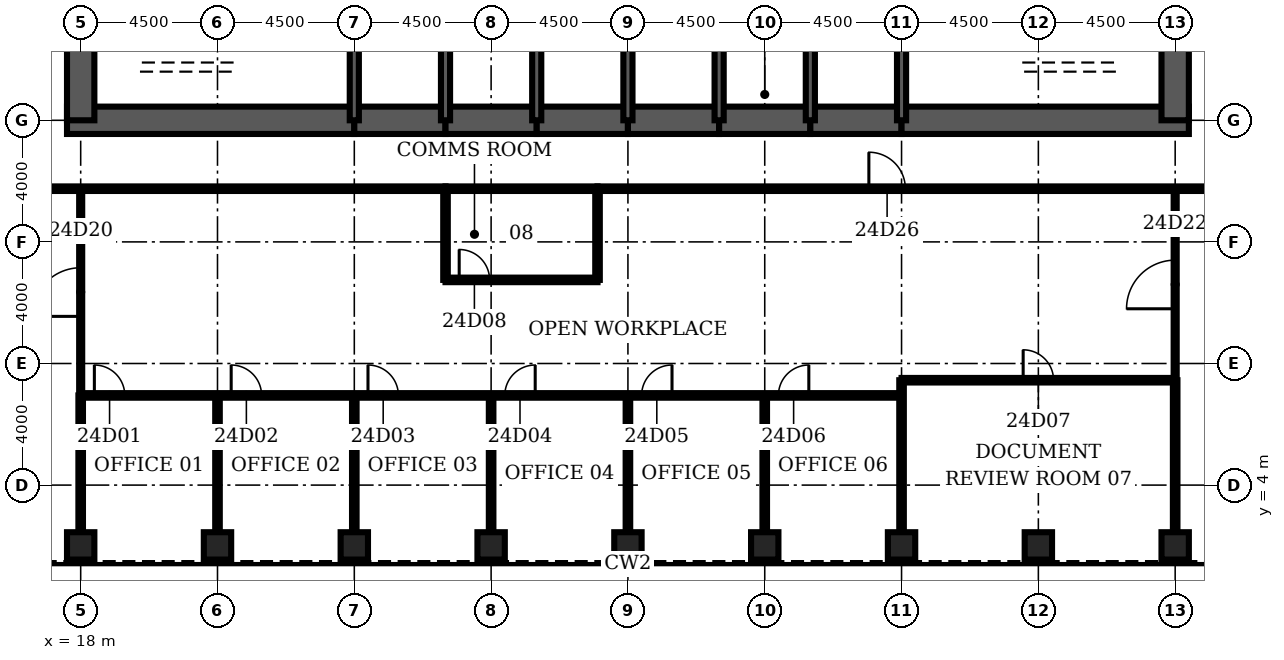
"""IFC4 building model, lengths in metres.
Left out: names, types, materials, properties, quantities, classifications, styles, units other than length and angle.
Written with IfcOpenShell. Run it as: python <this file> out.ifc"""

import sys

from ifc_helpers import new_model, si_unit, direction, frame, frame_2d, origin, origin_2d, place, context, subcontext, project, spatial, rectangle, hollow_rectangle, extrude, element, fill, save


model = new_model("IFC4")
c1 = context("Model", 3, precision=1e-05, world=origin(), true_north=direction((0.0, 1.0)))
c2 = subcontext(c1, "Body", "Model", "MODEL_VIEW")
j1 = project(units=[si_unit("LENGTHUNIT", "METRE"), si_unit("PLANEANGLEUNIT", "RADIAN")], contexts=[c1])
p1 = place(None, origin())
s1 = spatial("IfcSite", under=j1, at=p1, CompositionType="ELEMENT")
p2 = place(p1, origin())
s2 = spatial("IfcBuilding", under=s1, at=p2, CompositionType="ELEMENT")
p3 = place(p2, frame((0.0, 0.0, 113.1)))
s3 = spatial("IfcBuildingStorey", under=s2, at=p3, CompositionType="ELEMENT", Elevation=113.1)
for number, where, z_axis, x_axis in (
    (1, (18.0, 2.0, 0.0), (0.0, 0.0, 1.0), (0.0, 1.0, 0.0)),
    (2, (22.5, 2.0, 0.0), (0.0, 0.0, 1.0), (0.0, 1.0, 0.0)),
    (3, (27.0, 2.0, 0.0), (0.0, 0.0, 1.0), (0.0, 1.0, 0.0)),
    (4, (31.5, 2.0, 0.0), (0.0, 0.0, 1.0), (0.0, 1.0, 0.0)),
    (5, (36.0, 2.0, 0.0), (0.0, 0.0, 1.0), (0.0, 1.0, 0.0)),
    (6, (40.5, 2.0, 0.0), (0.0, 0.0, 1.0), (0.0, 1.0, 0.0)),
    (7, (45.0, 2.0, 0.0), (0.0, 0.0, 1.0), (0.0, 1.0, 0.0)),
    (8, (49.5, 2.0, 0.0), (0.0, 0.0, 1.0), (0.0, 1.0, 0.0)),
    (9, (54.0, 2.0, 0.0), (0.0, 0.0, 1.0), (0.0, 1.0, 0.0)),
):
    element("IfcColumn", number, at=place(p3, frame(where, z_axis=z_axis, x_axis=x_axis)), inside=s3, PredefinedType="COLUMN", context=c2, shape_type="SweptSolid", body=[
        extrude(hollow_rectangle(XDim=0.9, YDim=0.9, WallThickness=0.11, at=origin_2d()), origin(), (0.0, 0.0, 1.0), 4.2),
    ])
p4 = place(p3, frame((17.55, 16.0, 0.0), z_axis=(0.0, 0.0, 1.0), x_axis=(1.0, 0.0, 0.0)))
e10 = element("IfcWall", 10, at=p4, inside=s3, PredefinedType="SHEAR", context=c2, shape_type="SweptSolid", body=[
    extrude(rectangle(XDim=9.45, YDim=0.9, at=frame_2d((4.725, 0.0))), origin(), (0.0, 0.0, 1.0), 4.2),
])
for number, where, z_axis, x_axis in (
    (11, (27.0, 16.0, 0.0), (0.0, 0.0, 1.0), (1.0, 0.0, 0.0)),
    (12, (30.0, 16.0, 0.0), (0.0, 0.0, 1.0), (1.0, 0.0, 0.0)),
    (13, (33.0, 16.0, 0.0), (0.0, 0.0, 1.0), (1.0, 0.0, 0.0)),
    (14, (36.0, 16.0, 0.0), (0.0, 0.0, 1.0), (1.0, 0.0, 0.0)),
    (15, (39.0, 16.0, 0.0), (0.0, 0.0, 1.0), (1.0, 0.0, 0.0)),
    (16, (42.0, 16.0, 0.0), (0.0, 0.0, 1.0), (1.0, 0.0, 0.0)),
):
    element("IfcWall", number, at=place(p3, frame(where, z_axis=z_axis, x_axis=x_axis)), inside=s3, PredefinedType="SHEAR", context=c2, shape_type="SweptSolid", body=[
        extrude(rectangle(XDim=3.0, YDim=0.9, at=frame_2d((1.5, 0.0))), origin(), (0.0, 0.0, 1.0), 4.2),
    ])
p5 = place(p3, frame((45.0, 16.0, 0.0), z_axis=(0.0, 0.0, 1.0), x_axis=(1.0, 0.0, 0.0)))
e17 = element("IfcWall", 17, at=p5, inside=s3, PredefinedType="SHEAR", context=c2, shape_type="SweptSolid", body=[
    extrude(rectangle(XDim=9.45, YDim=0.9, at=frame_2d((4.725, 0.0))), origin(), (0.0, 0.0, 1.0), 4.2),
])
for number, where, z_axis, x_axis in (
    (18, (18.0, 19.2, 0.0), (0.0, 0.0, 1.0), (0.0, -1.0, 0.0)),
    (19, (54.0, 16.0, 0.0), (0.0, 0.0, 1.0), (0.0, 1.0, 0.0)),
):
    element("IfcWall", number, at=place(p3, frame(where, z_axis=z_axis, x_axis=x_axis)), inside=s3, PredefinedType="SHEAR", context=c2, shape_type="SweptSolid", body=[
        extrude(rectangle(XDim=3.2, YDim=0.9, at=frame_2d((1.6, 0.0))), origin(), (0.0, 0.0, 1.0), 4.2),
    ])
for number, where, z_axis, x_axis in (
    (20, (27.0, 16.0, 0.0), (0.0, 0.0, 1.0), (0.0, 1.0, 0.0)),
    (21, (30.0, 16.0, 0.0), (0.0, 0.0, 1.0), (0.0, 1.0, 0.0)),
    (22, (33.0, 16.0, 0.0), (0.0, 0.0, 1.0), (0.0, 1.0, 0.0)),
    (23, (36.0, 16.0, 0.0), (0.0, 0.0, 1.0), (0.0, 1.0, 0.0)),
    (24, (39.0, 16.0, 0.0), (0.0, 0.0, 1.0), (0.0, 1.0, 0.0)),
    (25, (42.0, 16.0, 0.0), (0.0, 0.0, 1.0), (0.0, 1.0, 0.0)),
    (26, (45.0, 16.0, 0.0), (0.0, 0.0, 1.0), (0.0, 1.0, 0.0)),
):
    element("IfcWall", number, at=place(p3, frame(where, z_axis=z_axis, x_axis=x_axis)), inside=s3, PredefinedType="SOLIDWALL", context=c2, shape_type="SweptSolid", body=[
        extrude(rectangle(XDim=3.2, YDim=0.3, at=frame_2d((1.6, 0.0))), origin(), (0.0, 0.0, 1.0), 4.2),
    ])
p6 = place(p3, frame((39.15, 17.4, 0.0), z_axis=(0.0, 0.0, 1.0), x_axis=(1.0, 0.0, 0.0)))
e27 = element("IfcWall", 27, at=p6, inside=s3, PredefinedType="SOLIDWALL", context=c2, shape_type="SweptSolid", body=[
    extrude(rectangle(XDim=2.7, YDim=0.3, at=frame_2d((1.35, 0.0))), origin(), (0.0, 0.0, 1.0), 4.04),
])
p7 = place(p6, frame((0.85, 0.0, 0.0)))
e28 = element("IfcOpeningElement", 28, at=p7, cuts=e27, PredefinedType="OPENING", context=c2, shape_type="SweptSolid", body=[
    extrude(rectangle(XDim=1.0, YDim=2.1, at=frame_2d((0.5, 1.05))), frame((0.0, 0.16, 0.0), z_axis=(0.0, -1.0, 0.0), x_axis=(1.0, 0.0, 0.0)), (0.0, 0.0, 1.0), 0.32),
])
p8 = place(p3, frame((18.0, 6.95, 0.0), z_axis=(0.0, 0.0, 1.0), x_axis=(1.0, 0.0, 0.0)))
e29 = element("IfcWall", 29, at=p8, inside=s3, PredefinedType="PARTITIONING", context=c2, shape_type="SweptSolid", body=[
    extrude(rectangle(XDim=27.0, YDim=0.15, at=frame_2d((13.5, 0.0))), origin(), (0.0, 0.0, 1.0), 3.0),
])
p9 = place(p8, frame((0.45, 0.0, 0.0)))
e30 = element("IfcOpeningElement", 30, at=p9, cuts=e29, PredefinedType="OPENING", context=c2, shape_type="SweptSolid", body=[
    extrude(rectangle(XDim=1.0, YDim=2.1, at=frame_2d((0.5, 1.05))), frame((0.0, 0.085, 0.0), z_axis=(0.0, -1.0, 0.0), x_axis=(1.0, 0.0, 0.0)), (0.0, 0.0, 1.0), 0.17),
])
p10 = place(p8, frame((4.95, 0.0, 0.0)))
e31 = element("IfcOpeningElement", 31, at=p10, cuts=e29, PredefinedType="OPENING", context=c2, shape_type="SweptSolid", body=[
    extrude(rectangle(XDim=1.0, YDim=2.1, at=frame_2d((0.5, 1.05))), frame((0.0, 0.085, 0.0), z_axis=(0.0, -1.0, 0.0), x_axis=(1.0, 0.0, 0.0)), (0.0, 0.0, 1.0), 0.17),
])
p11 = place(p8, frame((9.45, 0.0, 0.0)))
e32 = element("IfcOpeningElement", 32, at=p11, cuts=e29, PredefinedType="OPENING", context=c2, shape_type="SweptSolid", body=[
    extrude(rectangle(XDim=1.0, YDim=2.1, at=frame_2d((0.5, 1.05))), frame((0.0, 0.085, 0.0), z_axis=(0.0, -1.0, 0.0), x_axis=(1.0, 0.0, 0.0)), (0.0, 0.0, 1.0), 0.17),
])
p12 = place(p8, frame((13.95, 0.0, 0.0)))
e33 = element("IfcOpeningElement", 33, at=p12, cuts=e29, PredefinedType="OPENING", context=c2, shape_type="SweptSolid", body=[
    extrude(rectangle(XDim=1.0, YDim=2.1, at=frame_2d((0.5, 1.05))), frame((0.0, 0.085, 0.0), z_axis=(0.0, -1.0, 0.0), x_axis=(1.0, 0.0, 0.0)), (0.0, 0.0, 1.0), 0.17),
])
p13 = place(p8, frame((18.45, 0.0, 0.0)))
e34 = element("IfcOpeningElement", 34, at=p13, cuts=e29, PredefinedType="OPENING", context=c2, shape_type="SweptSolid", body=[
    extrude(rectangle(XDim=1.0, YDim=2.1, at=frame_2d((0.5, 1.05))), frame((0.0, 0.085, 0.0), z_axis=(0.0, -1.0, 0.0), x_axis=(1.0, 0.0, 0.0)), (0.0, 0.0, 1.0), 0.17),
])
p14 = place(p8, frame((22.95, 0.0, 0.0)))
e35 = element("IfcOpeningElement", 35, at=p14, cuts=e29, PredefinedType="OPENING", context=c2, shape_type="SweptSolid", body=[
    extrude(rectangle(XDim=1.0, YDim=2.1, at=frame_2d((0.5, 1.05))), frame((0.0, 0.085, 0.0), z_axis=(0.0, -1.0, 0.0), x_axis=(1.0, 0.0, 0.0)), (0.0, 0.0, 1.0), 0.17),
])
p15 = place(p3, frame((45.0, 7.45, 0.0), z_axis=(0.0, 0.0, 1.0), x_axis=(1.0, 0.0, 0.0)))
e36 = element("IfcWall", 36, at=p15, inside=s3, PredefinedType="PARTITIONING", context=c2, shape_type="SweptSolid", body=[
    extrude(rectangle(XDim=9.0, YDim=0.15, at=frame_2d((4.5, 0.0))), origin(), (0.0, 0.0, 1.0), 3.0),
])
p16 = place(p15, frame((4.0, 0.0, 0.0)))
e37 = element("IfcOpeningElement", 37, at=p16, cuts=e36, PredefinedType="OPENING", context=c2, shape_type="SweptSolid", body=[
    extrude(rectangle(XDim=1.0, YDim=2.1, at=frame_2d((0.5, 1.05))), frame((0.0, 0.085, 0.0), z_axis=(0.0, -1.0, 0.0), x_axis=(1.0, 0.0, 0.0)), (0.0, 0.0, 1.0), 0.17),
])
p17 = place(p3, frame((30.0, 10.75, 0.0), z_axis=(0.0, 0.0, 1.0), x_axis=(1.0, 0.0, 0.0)))
e38 = element("IfcWall", 38, at=p17, inside=s3, PredefinedType="PARTITIONING", context=c2, shape_type="SweptSolid", body=[
    extrude(rectangle(XDim=5.0, YDim=0.15, at=frame_2d((2.5, 0.0))), origin(), (0.0, 0.0, 1.0), 3.0),
])
p18 = place(p17, frame((0.45, 0.0, 0.0)))
e39 = element("IfcOpeningElement", 39, at=p18, cuts=e38, PredefinedType="OPENING", context=c2, shape_type="SweptSolid", body=[
    extrude(rectangle(XDim=1.0, YDim=2.1, at=frame_2d((0.5, 1.05))), frame((0.0, 0.085, 0.0), z_axis=(0.0, -1.0, 0.0), x_axis=(1.0, 0.0, 0.0)), (0.0, 0.0, 1.0), 0.17),
])
p19 = place(p3, frame((15.15, 13.75, 0.0), z_axis=(0.0, 0.0, 1.0), x_axis=(1.0, 0.0, 0.0)))
e40 = element("IfcWall", 40, at=p19, inside=s3, PredefinedType="PARTITIONING", context=c2, shape_type="SweptSolid", body=[
    extrude(rectangle(XDim=14.85, YDim=0.15, at=frame_2d((7.425, 0.0))), origin(), (0.0, 0.0, 1.0), 3.0),
])
p20 = place(p3, frame((30.0, 13.75, 0.0), z_axis=(0.0, 0.0, 1.0), x_axis=(1.0, 0.0, 0.0)))
e41 = element("IfcWall", 41, at=p20, inside=s3, PredefinedType="PARTITIONING", context=c2, shape_type="SweptSolid", body=[
    extrude(rectangle(XDim=5.0, YDim=0.15, at=frame_2d((2.5, 0.0))), origin(), (0.0, 0.0, 1.0), 3.0),
])
p21 = place(p3, frame((35.0, 13.75, 0.0), z_axis=(0.0, 0.0, 1.0), x_axis=(1.0, 0.0, 0.0)))
e42 = element("IfcWall", 42, at=p21, inside=s3, PredefinedType="PARTITIONING", context=c2, shape_type="SweptSolid", body=[
    extrude(rectangle(XDim=21.85, YDim=0.15, at=frame_2d((10.925, 0.0))), origin(), (0.0, 0.0, 1.0), 3.0),
])
p22 = place(p21, frame((8.925, 0.0, 0.0)))
e43 = element("IfcOpeningElement", 43, at=p22, cuts=e42, PredefinedType="OPENING", context=c2, shape_type="SweptSolid", body=[
    extrude(rectangle(XDim=1.2, YDim=2.1, at=frame_2d((0.6, 1.05))), frame((0.0, 0.085, 0.0), z_axis=(0.0, -1.0, 0.0), x_axis=(1.0, 0.0, 0.0)), (0.0, 0.0, 1.0), 0.17),
])
p23 = place(p3, frame((18.0, 2.45, 0.0), z_axis=(0.0, 0.0, 1.0), x_axis=(0.0, 1.0, 0.0)))
e44 = element("IfcWall", 44, at=p23, inside=s3, PredefinedType="PARTITIONING", context=c2, shape_type="SweptSolid", body=[
    extrude(rectangle(XDim=4.5, YDim=0.15, at=frame_2d((2.25, 0.0))), origin(), (0.0, 0.0, 1.0), 3.0),
])
p24 = place(p3, frame((18.0, 6.95, 0.0), z_axis=(0.0, 0.0, 1.0), x_axis=(0.0, 1.0, 0.0)))
e45 = element("IfcWall", 45, at=p24, inside=s3, PredefinedType="PARTITIONING", context=c2, shape_type="SweptSolid", body=[
    extrude(rectangle(XDim=6.8, YDim=0.1, at=frame_2d((3.4, 0.0))), origin(), (0.0, 0.0, 1.0), 3.0),
])
p25 = place(p24, frame((2.6, 0.0, 0.0)))
e46 = element("IfcOpeningElement", 46, at=p25, cuts=e45, PredefinedType="OPENING", context=c2, shape_type="SweptSolid", body=[
    extrude(rectangle(XDim=1.6, YDim=2.1, at=frame_2d((0.8, 1.05))), frame((0.0, 0.06, 0.0), z_axis=(0.0, -1.0, 0.0), x_axis=(1.0, 0.0, 0.0)), (0.0, 0.0, 1.0), 0.12),
])
for number, where, z_axis, x_axis in (
    (47, (22.5, 2.45, 0.0), (0.0, 0.0, 1.0), (0.0, 1.0, 0.0)),
    (48, (27.0, 2.45, 0.0), (0.0, 0.0, 1.0), (0.0, 1.0, 0.0)),
):
    element("IfcWall", number, at=place(p3, frame(where, z_axis=z_axis, x_axis=x_axis)), inside=s3, PredefinedType="PARTITIONING", context=c2, shape_type="SweptSolid", body=[
        extrude(rectangle(XDim=4.5, YDim=0.15, at=frame_2d((2.25, 0.0))), origin(), (0.0, 0.0, 1.0), 3.0),
    ])
p26 = place(p3, frame((30.0, 10.75, 0.0), z_axis=(0.0, 0.0, 1.0), x_axis=(0.0, 1.0, 0.0)))
e49 = element("IfcWall", 49, at=p26, inside=s3, PredefinedType="PARTITIONING", context=c2, shape_type="SweptSolid", body=[
    extrude(rectangle(XDim=3.0, YDim=0.15, at=frame_2d((1.5, 0.0))), origin(), (0.0, 0.0, 1.0), 3.0),
])
p27 = place(p3, frame((31.5, 2.45, 0.0), z_axis=(0.0, 0.0, 1.0), x_axis=(0.0, 1.0, 0.0)))
e50 = element("IfcWall", 50, at=p27, inside=s3, PredefinedType="PARTITIONING", context=c2, shape_type="SweptSolid", body=[
    extrude(rectangle(XDim=4.5, YDim=0.15, at=frame_2d((2.25, 0.0))), origin(), (0.0, 0.0, 1.0), 3.0),
])
p28 = place(p3, frame((35.0, 10.75, 0.0), z_axis=(0.0, 0.0, 1.0), x_axis=(0.0, 1.0, 0.0)))
e51 = element("IfcWall", 51, at=p28, inside=s3, PredefinedType="PARTITIONING", context=c2, shape_type="SweptSolid", body=[
    extrude(rectangle(XDim=3.0, YDim=0.15, at=frame_2d((1.5, 0.0))), origin(), (0.0, 0.0, 1.0), 3.0),
])
for number, where, z_axis, x_axis in (
    (52, (36.0, 2.45, 0.0), (0.0, 0.0, 1.0), (0.0, 1.0, 0.0)),
    (53, (40.5, 2.45, 0.0), (0.0, 0.0, 1.0), (0.0, 1.0, 0.0)),
):
    element("IfcWall", number, at=place(p3, frame(where, z_axis=z_axis, x_axis=x_axis)), inside=s3, PredefinedType="PARTITIONING", context=c2, shape_type="SweptSolid", body=[
        extrude(rectangle(XDim=4.5, YDim=0.15, at=frame_2d((2.25, 0.0))), origin(), (0.0, 0.0, 1.0), 3.0),
    ])
for number, where, z_axis, x_axis in (
    (54, (45.0, 2.45, 0.0), (0.0, 0.0, 1.0), (0.0, 1.0, 0.0)),
    (55, (54.0, 2.45, 0.0), (0.0, 0.0, 1.0), (0.0, 1.0, 0.0)),
):
    element("IfcWall", number, at=place(p3, frame(where, z_axis=z_axis, x_axis=x_axis)), inside=s3, PredefinedType="PARTITIONING", context=c2, shape_type="SweptSolid", body=[
        extrude(rectangle(XDim=5.0, YDim=0.15, at=frame_2d((2.5, 0.0))), origin(), (0.0, 0.0, 1.0), 3.0),
    ])
p29 = place(p3, frame((54.0, 7.45, 0.0), z_axis=(0.0, 0.0, 1.0), x_axis=(0.0, 1.0, 0.0)))
e56 = element("IfcWall", 56, at=p29, inside=s3, PredefinedType="PARTITIONING", context=c2, shape_type="SweptSolid", body=[
    extrude(rectangle(XDim=6.3, YDim=0.1, at=frame_2d((3.15, 0.0))), origin(), (0.0, 0.0, 1.0), 3.0),
])
p30 = place(p29, frame((2.35, 0.0, 0.0)))
e57 = element("IfcOpeningElement", 57, at=p30, cuts=e56, PredefinedType="OPENING", context=c2, shape_type="SweptSolid", body=[
    extrude(rectangle(XDim=1.6, YDim=2.1, at=frame_2d((0.8, 1.05))), frame((0.0, 0.06, 0.0), z_axis=(0.0, -1.0, 0.0), x_axis=(1.0, 0.0, 0.0)), (0.0, 0.0, 1.0), 0.12),
])
p31 = place(p7, origin())
e58 = element("IfcDoor", 58, at=p31, inside=s3, OperationType="SINGLE_SWING_LEFT", PredefinedType="DOOR", context=c2, shape_type="SweptSolid", body=[
    extrude(rectangle(XDim=1.0, YDim=2.1, at=frame_2d((0.5, 1.05))), frame((0.0, 0.025, 0.0), z_axis=(0.0, -1.0, 0.0), x_axis=(1.0, 0.0, 0.0)), (0.0, 0.0, 1.0), 0.05),
])
fill(e28, e58)
p32 = place(p9, origin())
e59 = element("IfcDoor", 59, at=p32, inside=s3, OperationType="SINGLE_SWING_LEFT", PredefinedType="DOOR", context=c2, shape_type="SweptSolid", body=[
    extrude(rectangle(XDim=1.0, YDim=2.1, at=frame_2d((0.5, 1.05))), frame((0.0, 0.025, 0.0), z_axis=(0.0, -1.0, 0.0), x_axis=(1.0, 0.0, 0.0)), (0.0, 0.0, 1.0), 0.05),
])
fill(e30, e59)
p33 = place(p10, origin())
e60 = element("IfcDoor", 60, at=p33, inside=s3, OperationType="SINGLE_SWING_LEFT", PredefinedType="DOOR", context=c2, shape_type="SweptSolid", body=[
    extrude(rectangle(XDim=1.0, YDim=2.1, at=frame_2d((0.5, 1.05))), frame((0.0, 0.025, 0.0), z_axis=(0.0, -1.0, 0.0), x_axis=(1.0, 0.0, 0.0)), (0.0, 0.0, 1.0), 0.05),
])
fill(e31, e60)
p34 = place(p11, origin())
e61 = element("IfcDoor", 61, at=p34, inside=s3, OperationType="SINGLE_SWING_LEFT", PredefinedType="DOOR", context=c2, shape_type="SweptSolid", body=[
    extrude(rectangle(XDim=1.0, YDim=2.1, at=frame_2d((0.5, 1.05))), frame((0.0, 0.025, 0.0), z_axis=(0.0, -1.0, 0.0), x_axis=(1.0, 0.0, 0.0)), (0.0, 0.0, 1.0), 0.05),
])
fill(e32, e61)
p35 = place(p12, origin())
e62 = element("IfcDoor", 62, at=p35, inside=s3, OperationType="SINGLE_SWING_RIGHT", PredefinedType="DOOR", context=c2, shape_type="SweptSolid", body=[
    extrude(rectangle(XDim=1.0, YDim=2.1, at=frame_2d((0.5, 1.05))), frame((0.0, 0.025, 0.0), z_axis=(0.0, -1.0, 0.0), x_axis=(1.0, 0.0, 0.0)), (0.0, 0.0, 1.0), 0.05),
])
fill(e33, e62)
p36 = place(p13, origin())
e63 = element("IfcDoor", 63, at=p36, inside=s3, OperationType="SINGLE_SWING_RIGHT", PredefinedType="DOOR", context=c2, shape_type="SweptSolid", body=[
    extrude(rectangle(XDim=1.0, YDim=2.1, at=frame_2d((0.5, 1.05))), frame((0.0, 0.025, 0.0), z_axis=(0.0, -1.0, 0.0), x_axis=(1.0, 0.0, 0.0)), (0.0, 0.0, 1.0), 0.05),
])
fill(e34, e63)
p37 = place(p14, origin())
e64 = element("IfcDoor", 64, at=p37, inside=s3, OperationType="SINGLE_SWING_RIGHT", PredefinedType="DOOR", context=c2, shape_type="SweptSolid", body=[
    extrude(rectangle(XDim=1.0, YDim=2.1, at=frame_2d((0.5, 1.05))), frame((0.0, 0.025, 0.0), z_axis=(0.0, -1.0, 0.0), x_axis=(1.0, 0.0, 0.0)), (0.0, 0.0, 1.0), 0.05),
])
fill(e35, e64)
p38 = place(p16, origin())
e65 = element("IfcDoor", 65, at=p38, inside=s3, OperationType="SINGLE_SWING_LEFT", PredefinedType="DOOR", context=c2, shape_type="SweptSolid", body=[
    extrude(rectangle(XDim=1.0, YDim=2.1, at=frame_2d((0.5, 1.05))), frame((0.0, 0.025, 0.0), z_axis=(0.0, -1.0, 0.0), x_axis=(1.0, 0.0, 0.0)), (0.0, 0.0, 1.0), 0.05),
])
fill(e37, e65)
p39 = place(p18, origin())
e66 = element("IfcDoor", 66, at=p39, inside=s3, OperationType="SINGLE_SWING_LEFT", PredefinedType="DOOR", context=c2, shape_type="SweptSolid", body=[
    extrude(rectangle(XDim=1.0, YDim=2.1, at=frame_2d((0.5, 1.05))), frame((0.0, 0.025, 0.0), z_axis=(0.0, -1.0, 0.0), x_axis=(1.0, 0.0, 0.0)), (0.0, 0.0, 1.0), 0.05),
])
fill(e39, e66)
p40 = place(p25, origin())
e67 = element("IfcDoor", 67, at=p40, inside=s3, OperationType="SINGLE_SWING_LEFT", PredefinedType="DOOR", context=c2, shape_type="SweptSolid", body=[
    extrude(rectangle(XDim=1.6, YDim=2.1, at=frame_2d((0.8, 1.05))), frame((0.0, 0.025, 0.0), z_axis=(0.0, -1.0, 0.0), x_axis=(1.0, 0.0, 0.0)), (0.0, 0.0, 1.0), 0.05),
])
fill(e46, e67)
p41 = place(p30, origin())
e68 = element("IfcDoor", 68, at=p41, inside=s3, OperationType="SINGLE_SWING_LEFT", PredefinedType="DOOR", context=c2, shape_type="SweptSolid", body=[
    extrude(rectangle(XDim=1.6, YDim=2.1, at=frame_2d((0.8, 1.05))), frame((0.0, 0.025, 0.0), z_axis=(0.0, -1.0, 0.0), x_axis=(1.0, 0.0, 0.0)), (0.0, 0.0, 1.0), 0.05),
])
fill(e57, e68)
p42 = place(p22, origin())
e69 = element("IfcDoor", 69, at=p42, inside=s3, OperationType="SINGLE_SWING_LEFT", PredefinedType="DOOR", context=c2, shape_type="SweptSolid", body=[
    extrude(rectangle(XDim=1.2, YDim=2.1, at=frame_2d((0.6, 1.05))), frame((0.0, 0.025, 0.0), z_axis=(0.0, -1.0, 0.0), x_axis=(1.0, 0.0, 0.0)), (0.0, 0.0, 1.0), 0.05),
])
fill(e43, e69)
save(model, sys.argv[1])
